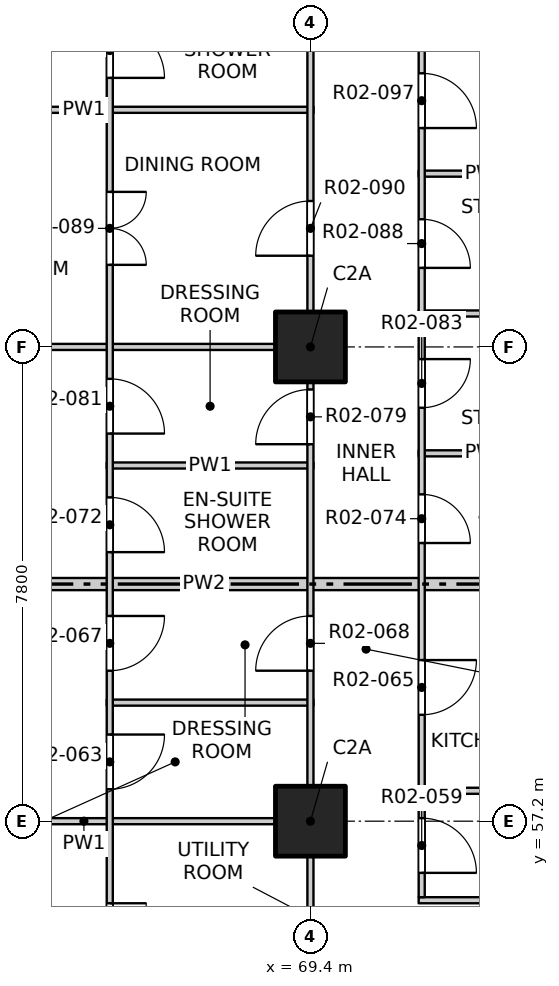
"""IFC4 building model, lengths in metres.
Left out: names, types, materials, properties, quantities, classifications, styles, units other than length and angle.
Written with IfcOpenShell. Run it as: python <this file> out.ifc"""

import sys

from ifc_helpers import new_model, si_unit, direction, frame, frame_2d, origin, origin_2d, place, context, subcontext, project, spatial, rectangle, extrude, element, fill, save


model = new_model("IFC4")
c1 = context("Model", 3, precision=1e-05, world=origin(), true_north=direction((0.0, 1.0)))
c2 = subcontext(c1, "Body", "Model", "MODEL_VIEW")
j1 = project(units=[si_unit("LENGTHUNIT", "METRE"), si_unit("PLANEANGLEUNIT", "RADIAN")], contexts=[c1])
p1 = place(None, origin())
s1 = spatial("IfcSite", under=j1, at=p1, CompositionType="ELEMENT")
p2 = place(p1, origin())
s2 = spatial("IfcBuilding", under=s1, at=p2, CompositionType="ELEMENT")
p3 = place(p2, frame((0.0, 0.0, 36.5)))
s3 = spatial("IfcBuildingStorey", under=s2, at=p3, CompositionType="ELEMENT", Elevation=36.5)
for number, where, z_axis, x_axis in (
    (1, (69.4, 57.2, -0.25), (0.0, 0.0, 1.0), (1.0, 0.0, 0.0)),
    (2, (69.4, 65.0, -0.25), (0.0, 0.0, 1.0), (1.0, 0.0, 0.0)),
):
    element("IfcColumn", number, at=place(p3, frame(where, z_axis=z_axis, x_axis=x_axis)), inside=s3, PredefinedType="COLUMN", context=c2, shape_type="SweptSolid", body=[
        extrude(rectangle(XDim=1.15, YDim=1.15, at=origin_2d()), origin(), (0.0, 0.0, 1.0), 3.4),
    ])
p4 = place(p3, frame((71.18, 55.9, 0.0), z_axis=(0.0, 0.0, 1.0), x_axis=(1.0, 0.0, 0.0)))
e3 = element("IfcWall", 3, at=p4, inside=s3, PredefinedType="PARTITIONING", context=c2, shape_type="SweptSolid", body=[
    extrude(rectangle(XDim=2.22, YDim=0.1, at=frame_2d((1.11, 0.0))), origin(), (0.0, 0.0, 1.0), 3.15),
])
p5 = place(p3, frame((61.9, 57.2, 0.0), z_axis=(0.0, 0.0, 1.0), x_axis=(1.0, 0.0, 0.0)))
e4 = element("IfcWall", 4, at=p5, inside=s3, PredefinedType="PARTITIONING", context=c2, shape_type="SweptSolid", body=[
    extrude(rectangle(XDim=7.55, YDim=0.1, at=frame_2d((3.775, 0.0))), origin(), (0.0, 0.0, 1.0), 2.55),
])
p6 = place(p3, frame((71.18, 57.7, 0.0), z_axis=(0.0, 0.0, 1.0), x_axis=(1.0, 0.0, 0.0)))
e5 = element("IfcWall", 5, at=p6, inside=s3, PredefinedType="PARTITIONING", context=c2, shape_type="SweptSolid", body=[
    extrude(rectangle(XDim=2.22, YDim=0.1, at=frame_2d((1.11, 0.0))), origin(), (0.0, 0.0, 1.0), 3.15),
])
p7 = place(p3, frame((66.05, 59.15, 0.0), z_axis=(0.0, 0.0, 1.0), x_axis=(1.0, 0.0, 0.0)))
e6 = element("IfcWall", 6, at=p7, inside=s3, PredefinedType="PARTITIONING", context=c2, shape_type="SweptSolid", body=[
    extrude(rectangle(XDim=3.4, YDim=0.1, at=frame_2d((1.7, 0.0))), origin(), (0.0, 0.0, 1.0), 3.15),
])
p8 = place(p3, frame((61.9, 61.1, 0.0), z_axis=(0.0, 0.0, 1.0), x_axis=(1.0, 0.0, 0.0)))
e7 = element("IfcWall", 7, at=p8, inside=s3, PredefinedType="PARTITIONING", context=c2, shape_type="SweptSolid", body=[
    extrude(rectangle(XDim=11.5, YDim=0.2, at=frame_2d((5.75, 0.0))), origin(), (0.0, 0.0, 1.0), 3.15),
])
p9 = place(p3, frame((66.05, 63.05, 0.0), z_axis=(0.0, 0.0, 1.0), x_axis=(1.0, 0.0, 0.0)))
e8 = element("IfcWall", 8, at=p9, inside=s3, PredefinedType="PARTITIONING", context=c2, shape_type="SweptSolid", body=[
    extrude(rectangle(XDim=3.4, YDim=0.1, at=frame_2d((1.7, 0.0))), origin(), (0.0, 0.0, 1.0), 3.15),
])
p10 = place(p3, frame((71.18, 63.25, 0.0), z_axis=(0.0, 0.0, 1.0), x_axis=(1.0, 0.0, 0.0)))
e9 = element("IfcWall", 9, at=p10, inside=s3, PredefinedType="PARTITIONING", context=c2, shape_type="SweptSolid", body=[
    extrude(rectangle(XDim=2.22, YDim=0.1, at=frame_2d((1.11, 0.0))), origin(), (0.0, 0.0, 1.0), 3.15),
])
p11 = place(p3, frame((61.9, 65.0, 0.0), z_axis=(0.0, 0.0, 1.0), x_axis=(1.0, 0.0, 0.0)))
e10 = element("IfcWall", 10, at=p11, inside=s3, PredefinedType="PARTITIONING", context=c2, shape_type="SweptSolid", body=[
    extrude(rectangle(XDim=7.55, YDim=0.1, at=frame_2d((3.775, 0.0))), origin(), (0.0, 0.0, 1.0), 2.55),
])
for number, where, z_axis, x_axis in (
    (11, (71.18, 65.55, 0.0), (0.0, 0.0, 1.0), (1.0, 0.0, 0.0)),
    (12, (71.18, 67.85, 0.0), (0.0, 0.0, 1.0), (1.0, 0.0, 0.0)),
):
    element("IfcWall", number, at=place(p3, frame(where, z_axis=z_axis, x_axis=x_axis)), inside=s3, PredefinedType="PARTITIONING", context=c2, shape_type="SweptSolid", body=[
        extrude(rectangle(XDim=2.22, YDim=0.1, at=frame_2d((1.11, 0.0))), origin(), (0.0, 0.0, 1.0), 3.15),
    ])
p12 = place(p3, frame((61.9, 68.9, 0.0), z_axis=(0.0, 0.0, 1.0), x_axis=(1.0, 0.0, 0.0)))
e13 = element("IfcWall", 13, at=p12, inside=s3, PredefinedType="PARTITIONING", context=c2, shape_type="SweptSolid", body=[
    extrude(rectangle(XDim=7.55, YDim=0.1, at=frame_2d((3.775, 0.0))), origin(), (0.0, 0.0, 1.0), 3.15),
])
p13 = place(p3, frame((66.1, 41.9, 0.0), z_axis=(0.0, 0.0, 1.0), x_axis=(0.0, 1.0, 0.0)))
e14 = element("IfcWall", 14, at=p13, inside=s3, PredefinedType="PARTITIONING", context=c2, shape_type="SweptSolid", body=[
    extrude(rectangle(XDim=34.7, YDim=0.1, at=frame_2d((17.35, 0.0))), origin(), (0.0, 0.0, 1.0), 3.15),
])
p14 = place(p13, frame((1.05, 0.0, 0.0)))
e15 = element("IfcOpeningElement", 15, at=p14, cuts=e14, PredefinedType="OPENING", context=c2, shape_type="SweptSolid", body=[
    extrude(rectangle(XDim=1.2, YDim=2.1, at=frame_2d((0.6, 1.05))), frame((0.0, 0.06, 0.0), z_axis=(0.0, -1.0, 0.0), x_axis=(1.0, 0.0, 0.0)), (0.0, 0.0, 1.0), 0.12),
])
p15 = place(p13, frame((4.95, 0.0, 0.0)))
e16 = element("IfcOpeningElement", 16, at=p15, cuts=e14, PredefinedType="OPENING", context=c2, shape_type="SweptSolid", body=[
    extrude(rectangle(XDim=1.2, YDim=2.1, at=frame_2d((0.6, 1.05))), frame((0.0, 0.06, 0.0), z_axis=(0.0, -1.0, 0.0), x_axis=(1.0, 0.0, 0.0)), (0.0, 0.0, 1.0), 0.12),
])
p16 = place(p13, frame((8.025, 0.0, 0.0)))
e17 = element("IfcOpeningElement", 17, at=p16, cuts=e14, PredefinedType="OPENING", context=c2, shape_type="SweptSolid", body=[
    extrude(rectangle(XDim=0.9, YDim=2.1, at=frame_2d((0.45, 1.05))), frame((0.0, 0.06, 0.0), z_axis=(0.0, -1.0, 0.0), x_axis=(1.0, 0.0, 0.0)), (0.0, 0.0, 1.0), 0.12),
])
p17 = place(p13, frame((9.975, 0.0, 0.0)))
e18 = element("IfcOpeningElement", 18, at=p17, cuts=e14, PredefinedType="OPENING", context=c2, shape_type="SweptSolid", body=[
    extrude(rectangle(XDim=0.9, YDim=2.1, at=frame_2d((0.45, 1.05))), frame((0.0, 0.06, 0.0), z_axis=(0.0, -1.0, 0.0), x_axis=(1.0, 0.0, 0.0)), (0.0, 0.0, 1.0), 0.12),
])
p18 = place(p13, frame((12.75, 0.0, 0.0)))
e19 = element("IfcOpeningElement", 19, at=p18, cuts=e14, PredefinedType="OPENING", context=c2, shape_type="SweptSolid", body=[
    extrude(rectangle(XDim=1.2, YDim=2.1, at=frame_2d((0.6, 1.05))), frame((0.0, 0.06, 0.0), z_axis=(0.0, -1.0, 0.0), x_axis=(1.0, 0.0, 0.0)), (0.0, 0.0, 1.0), 0.12),
])
p19 = place(p13, frame((15.825, 0.0, 0.0)))
e20 = element("IfcOpeningElement", 20, at=p19, cuts=e14, PredefinedType="OPENING", context=c2, shape_type="SweptSolid", body=[
    extrude(rectangle(XDim=0.9, YDim=2.1, at=frame_2d((0.45, 1.05))), frame((0.0, 0.06, 0.0), z_axis=(0.0, -1.0, 0.0), x_axis=(1.0, 0.0, 0.0)), (0.0, 0.0, 1.0), 0.12),
])
p20 = place(p13, frame((17.775, 0.0, 0.0)))
e21 = element("IfcOpeningElement", 21, at=p20, cuts=e14, PredefinedType="OPENING", context=c2, shape_type="SweptSolid", body=[
    extrude(rectangle(XDim=0.9, YDim=2.1, at=frame_2d((0.45, 1.05))), frame((0.0, 0.06, 0.0), z_axis=(0.0, -1.0, 0.0), x_axis=(1.0, 0.0, 0.0)), (0.0, 0.0, 1.0), 0.12),
])
p21 = place(p13, frame((19.725, 0.0, 0.0)))
e22 = element("IfcOpeningElement", 22, at=p21, cuts=e14, PredefinedType="OPENING", context=c2, shape_type="SweptSolid", body=[
    extrude(rectangle(XDim=0.9, YDim=2.1, at=frame_2d((0.45, 1.05))), frame((0.0, 0.06, 0.0), z_axis=(0.0, -1.0, 0.0), x_axis=(1.0, 0.0, 0.0)), (0.0, 0.0, 1.0), 0.12),
])
p22 = place(p13, frame((21.675, 0.0, 0.0)))
e23 = element("IfcOpeningElement", 23, at=p22, cuts=e14, PredefinedType="OPENING", context=c2, shape_type="SweptSolid", body=[
    extrude(rectangle(XDim=0.9, YDim=2.1, at=frame_2d((0.45, 1.05))), frame((0.0, 0.06, 0.0), z_axis=(0.0, -1.0, 0.0), x_axis=(1.0, 0.0, 0.0)), (0.0, 0.0, 1.0), 0.12),
])
p23 = place(p13, frame((24.45, 0.0, 0.0)))
e24 = element("IfcOpeningElement", 24, at=p23, cuts=e14, PredefinedType="OPENING", context=c2, shape_type="SweptSolid", body=[
    extrude(rectangle(XDim=1.2, YDim=2.1, at=frame_2d((0.6, 1.05))), frame((0.0, 0.06, 0.0), z_axis=(0.0, -1.0, 0.0), x_axis=(1.0, 0.0, 0.0)), (0.0, 0.0, 1.0), 0.12),
])
p24 = place(p13, frame((27.525, 0.0, 0.0)))
e25 = element("IfcOpeningElement", 25, at=p24, cuts=e14, PredefinedType="OPENING", context=c2, shape_type="SweptSolid", body=[
    extrude(rectangle(XDim=0.9, YDim=2.1, at=frame_2d((0.45, 1.05))), frame((0.0, 0.06, 0.0), z_axis=(0.0, -1.0, 0.0), x_axis=(1.0, 0.0, 0.0)), (0.0, 0.0, 1.0), 0.12),
])
p25 = place(p13, frame((29.475, 0.0, 0.0)))
e26 = element("IfcOpeningElement", 26, at=p25, cuts=e14, PredefinedType="OPENING", context=c2, shape_type="SweptSolid", body=[
    extrude(rectangle(XDim=0.9, YDim=2.1, at=frame_2d((0.45, 1.05))), frame((0.0, 0.06, 0.0), z_axis=(0.0, -1.0, 0.0), x_axis=(1.0, 0.0, 0.0)), (0.0, 0.0, 1.0), 0.12),
])
p26 = place(p13, frame((31.425, 0.0, 0.0)))
e27 = element("IfcOpeningElement", 27, at=p26, cuts=e14, PredefinedType="OPENING", context=c2, shape_type="SweptSolid", body=[
    extrude(rectangle(XDim=0.9, YDim=2.1, at=frame_2d((0.45, 1.05))), frame((0.0, 0.06, 0.0), z_axis=(0.0, -1.0, 0.0), x_axis=(1.0, 0.0, 0.0)), (0.0, 0.0, 1.0), 0.12),
])
p27 = place(p13, frame((33.375, 0.0, 0.0)))
e28 = element("IfcOpeningElement", 28, at=p27, cuts=e14, PredefinedType="OPENING", context=c2, shape_type="SweptSolid", body=[
    extrude(rectangle(XDim=0.9, YDim=2.1, at=frame_2d((0.45, 1.05))), frame((0.0, 0.06, 0.0), z_axis=(0.0, -1.0, 0.0), x_axis=(1.0, 0.0, 0.0)), (0.0, 0.0, 1.0), 0.12),
])
p28 = place(p3, frame((69.4, 41.9, 0.0), z_axis=(0.0, 0.0, 1.0), x_axis=(0.0, 1.0, 0.0)))
e29 = element("IfcWall", 29, at=p28, inside=s3, PredefinedType="PARTITIONING", context=c2, shape_type="SweptSolid", body=[
    extrude(rectangle(XDim=46.2, YDim=0.1, at=frame_2d((23.1, 0.0))), origin(), (0.0, 0.0, 1.0), 3.15),
])
p29 = place(p28, frame((1.2, 0.0, 0.0)))
e30 = element("IfcOpeningElement", 30, at=p29, cuts=e29, PredefinedType="OPENING", context=c2, shape_type="SweptSolid", body=[
    extrude(rectangle(XDim=0.9, YDim=2.1, at=frame_2d((0.45, 1.05))), frame((0.0, 0.06, 0.0), z_axis=(0.0, -1.0, 0.0), x_axis=(1.0, 0.0, 0.0)), (0.0, 0.0, 1.0), 0.12),
])
p30 = place(p28, frame((5.1, 0.0, 0.0)))
e31 = element("IfcOpeningElement", 31, at=p30, cuts=e29, PredefinedType="OPENING", context=c2, shape_type="SweptSolid", body=[
    extrude(rectangle(XDim=0.9, YDim=2.1, at=frame_2d((0.45, 1.05))), frame((0.0, 0.06, 0.0), z_axis=(0.0, -1.0, 0.0), x_axis=(1.0, 0.0, 0.0)), (0.0, 0.0, 1.0), 0.12),
])
p31 = place(p28, frame((9.975, 0.0, 0.0)))
e32 = element("IfcOpeningElement", 32, at=p31, cuts=e29, PredefinedType="OPENING", context=c2, shape_type="SweptSolid", body=[
    extrude(rectangle(XDim=0.9, YDim=2.1, at=frame_2d((0.45, 1.05))), frame((0.0, 0.06, 0.0), z_axis=(0.0, -1.0, 0.0), x_axis=(1.0, 0.0, 0.0)), (0.0, 0.0, 1.0), 0.12),
])
p32 = place(p28, frame((12.9, 0.0, 0.0)))
e33 = element("IfcOpeningElement", 33, at=p32, cuts=e29, PredefinedType="OPENING", context=c2, shape_type="SweptSolid", body=[
    extrude(rectangle(XDim=0.9, YDim=2.1, at=frame_2d((0.45, 1.05))), frame((0.0, 0.06, 0.0), z_axis=(0.0, -1.0, 0.0), x_axis=(1.0, 0.0, 0.0)), (0.0, 0.0, 1.0), 0.12),
])
p33 = place(p28, frame((17.775, 0.0, 0.0)))
e34 = element("IfcOpeningElement", 34, at=p33, cuts=e29, PredefinedType="OPENING", context=c2, shape_type="SweptSolid", body=[
    extrude(rectangle(XDim=0.9, YDim=2.1, at=frame_2d((0.45, 1.05))), frame((0.0, 0.06, 0.0), z_axis=(0.0, -1.0, 0.0), x_axis=(1.0, 0.0, 0.0)), (0.0, 0.0, 1.0), 0.12),
])
p34 = place(p28, frame((21.5, 0.0, 0.0)))
e35 = element("IfcOpeningElement", 35, at=p34, cuts=e29, PredefinedType="OPENING", context=c2, shape_type="SweptSolid", body=[
    extrude(rectangle(XDim=0.9, YDim=2.1, at=frame_2d((0.45, 1.05))), frame((0.0, 0.06, 0.0), z_axis=(0.0, -1.0, 0.0), x_axis=(1.0, 0.0, 0.0)), (0.0, 0.0, 1.0), 0.12),
])
p35 = place(p28, frame((24.6, 0.0, 0.0)))
e36 = element("IfcOpeningElement", 36, at=p35, cuts=e29, PredefinedType="OPENING", context=c2, shape_type="SweptSolid", body=[
    extrude(rectangle(XDim=0.9, YDim=2.1, at=frame_2d((0.45, 1.05))), frame((0.0, 0.06, 0.0), z_axis=(0.0, -1.0, 0.0), x_axis=(1.0, 0.0, 0.0)), (0.0, 0.0, 1.0), 0.12),
])
p36 = place(p28, frame((29.3, 0.0, 0.0)))
e37 = element("IfcOpeningElement", 37, at=p36, cuts=e29, PredefinedType="OPENING", context=c2, shape_type="SweptSolid", body=[
    extrude(rectangle(XDim=0.9, YDim=2.1, at=frame_2d((0.45, 1.05))), frame((0.0, 0.06, 0.0), z_axis=(0.0, -1.0, 0.0), x_axis=(1.0, 0.0, 0.0)), (0.0, 0.0, 1.0), 0.12),
])
p37 = place(p28, frame((33.375, 0.0, 0.0)))
e38 = element("IfcOpeningElement", 38, at=p37, cuts=e29, PredefinedType="OPENING", context=c2, shape_type="SweptSolid", body=[
    extrude(rectangle(XDim=0.9, YDim=2.1, at=frame_2d((0.45, 1.05))), frame((0.0, 0.06, 0.0), z_axis=(0.0, -1.0, 0.0), x_axis=(1.0, 0.0, 0.0)), (0.0, 0.0, 1.0), 0.12),
])
p38 = place(p28, frame((37.1, 0.0, 0.0)))
e39 = element("IfcOpeningElement", 39, at=p38, cuts=e29, PredefinedType="OPENING", context=c2, shape_type="SweptSolid", body=[
    extrude(rectangle(XDim=0.9, YDim=2.1, at=frame_2d((0.45, 1.05))), frame((0.0, 0.06, 0.0), z_axis=(0.0, -1.0, 0.0), x_axis=(1.0, 0.0, 0.0)), (0.0, 0.0, 1.0), 0.12),
])
p39 = place(p28, frame((41.175, 0.0, 0.0)))
e40 = element("IfcOpeningElement", 40, at=p39, cuts=e29, PredefinedType="OPENING", context=c2, shape_type="SweptSolid", body=[
    extrude(rectangle(XDim=0.9, YDim=2.1, at=frame_2d((0.45, 1.05))), frame((0.0, 0.06, 0.0), z_axis=(0.0, -1.0, 0.0), x_axis=(1.0, 0.0, 0.0)), (0.0, 0.0, 1.0), 0.12),
])
p40 = place(p28, frame((44.1, 0.0, 0.0)))
e41 = element("IfcOpeningElement", 41, at=p40, cuts=e29, PredefinedType="OPENING", context=c2, shape_type="SweptSolid", body=[
    extrude(rectangle(XDim=0.9, YDim=2.1, at=frame_2d((0.45, 1.05))), frame((0.0, 0.06, 0.0), z_axis=(0.0, -1.0, 0.0), x_axis=(1.0, 0.0, 0.0)), (0.0, 0.0, 1.0), 0.12),
])
p41 = place(p3, frame((71.23, 55.95, 0.0), z_axis=(0.0, 0.0, 1.0), x_axis=(0.0, 1.0, 0.0)))
e42 = element("IfcWall", 42, at=p41, inside=s3, PredefinedType="PARTITIONING", context=c2, shape_type="SweptSolid", body=[
    extrude(rectangle(XDim=14.25, YDim=0.1, at=frame_2d((7.125, 0.0))), origin(), (0.0, 0.0, 1.0), 3.15),
])
p42 = place(p41, frame((0.4, 0.0, 0.0)))
e43 = element("IfcOpeningElement", 43, at=p42, cuts=e42, PredefinedType="OPENING", context=c2, shape_type="SweptSolid", body=[
    extrude(rectangle(XDim=0.9, YDim=2.1, at=frame_2d((0.45, 1.05))), frame((0.0, 0.06, 0.0), z_axis=(0.0, -1.0, 0.0), x_axis=(1.0, 0.0, 0.0)), (0.0, 0.0, 1.0), 0.12),
])
p43 = place(p41, frame((3.0, 0.0, 0.0)))
e44 = element("IfcOpeningElement", 44, at=p43, cuts=e42, PredefinedType="OPENING", context=c2, shape_type="SweptSolid", body=[
    extrude(rectangle(XDim=0.9, YDim=2.1, at=frame_2d((0.45, 1.05))), frame((0.0, 0.06, 0.0), z_axis=(0.0, -1.0, 0.0), x_axis=(1.0, 0.0, 0.0)), (0.0, 0.0, 1.0), 0.12),
])
p44 = place(p41, frame((5.825, 0.0, 0.0)))
e45 = element("IfcOpeningElement", 45, at=p44, cuts=e42, PredefinedType="OPENING", context=c2, shape_type="SweptSolid", body=[
    extrude(rectangle(XDim=0.8, YDim=2.1, at=frame_2d((0.4, 1.05))), frame((0.0, 0.06, 0.0), z_axis=(0.0, -1.0, 0.0), x_axis=(1.0, 0.0, 0.0)), (0.0, 0.0, 1.0), 0.12),
])
p45 = place(p41, frame((8.05, 0.0, 0.0)))
e46 = element("IfcOpeningElement", 46, at=p45, cuts=e42, PredefinedType="OPENING", context=c2, shape_type="SweptSolid", body=[
    extrude(rectangle(XDim=0.8, YDim=2.1, at=frame_2d((0.4, 1.05))), frame((0.0, 0.06, 0.0), z_axis=(0.0, -1.0, 0.0), x_axis=(1.0, 0.0, 0.0)), (0.0, 0.0, 1.0), 0.12),
])
p46 = place(p41, frame((10.35, 0.0, 0.0)))
e47 = element("IfcOpeningElement", 47, at=p46, cuts=e42, PredefinedType="OPENING", context=c2, shape_type="SweptSolid", body=[
    extrude(rectangle(XDim=0.8, YDim=2.1, at=frame_2d((0.4, 1.05))), frame((0.0, 0.06, 0.0), z_axis=(0.0, -1.0, 0.0), x_axis=(1.0, 0.0, 0.0)), (0.0, 0.0, 1.0), 0.12),
])
p47 = place(p41, frame((12.65, 0.0, 0.0)))
e48 = element("IfcOpeningElement", 48, at=p47, cuts=e42, PredefinedType="OPENING", context=c2, shape_type="SweptSolid", body=[
    extrude(rectangle(XDim=0.9, YDim=2.1, at=frame_2d((0.45, 1.05))), frame((0.0, 0.06, 0.0), z_axis=(0.0, -1.0, 0.0), x_axis=(1.0, 0.0, 0.0)), (0.0, 0.0, 1.0), 0.12),
])
p48 = place(p18, origin())
e49 = element("IfcDoor", 49, at=p48, inside=s3, OperationType="DOUBLE_DOOR_SINGLE_SWING", PredefinedType="DOOR", context=c2, shape_type="SweptSolid", body=[
    extrude(rectangle(XDim=1.2, YDim=2.1, at=frame_2d((0.6, 1.05))), frame((0.0, 0.025, 0.0), z_axis=(0.0, -1.0, 0.0), x_axis=(1.0, 0.0, 0.0)), (0.0, 0.0, 1.0), 0.05),
])
fill(e19, e49)
p49 = place(p42, origin())
e50 = element("IfcDoor", 50, at=p49, inside=s3, OperationType="SINGLE_SWING_RIGHT", PredefinedType="DOOR", context=c2, shape_type="SweptSolid", body=[
    extrude(rectangle(XDim=0.9, YDim=2.1, at=frame_2d((0.45, 1.05))), frame((0.0, 0.025, 0.0), z_axis=(0.0, -1.0, 0.0), x_axis=(1.0, 0.0, 0.0)), (0.0, 0.0, 1.0), 0.05),
])
fill(e43, e50)
p50 = place(p19, origin())
e51 = element("IfcDoor", 51, at=p50, inside=s3, OperationType="SINGLE_SWING_LEFT", PredefinedType="DOOR", context=c2, shape_type="SweptSolid", body=[
    extrude(rectangle(XDim=0.9, YDim=2.1, at=frame_2d((0.45, 1.05))), frame((0.0, 0.025, 0.0), z_axis=(0.0, -1.0, 0.0), x_axis=(1.0, 0.0, 0.0)), (0.0, 0.0, 1.0), 0.05),
])
fill(e20, e51)
p51 = place(p43, origin())
e52 = element("IfcDoor", 52, at=p51, inside=s3, OperationType="SINGLE_SWING_LEFT", PredefinedType="DOOR", context=c2, shape_type="SweptSolid", body=[
    extrude(rectangle(XDim=0.9, YDim=2.1, at=frame_2d((0.45, 1.05))), frame((0.0, 0.025, 0.0), z_axis=(0.0, -1.0, 0.0), x_axis=(1.0, 0.0, 0.0)), (0.0, 0.0, 1.0), 0.05),
])
fill(e44, e52)
p52 = place(p20, origin())
e53 = element("IfcDoor", 53, at=p52, inside=s3, OperationType="SINGLE_SWING_LEFT", PredefinedType="DOOR", context=c2, shape_type="SweptSolid", body=[
    extrude(rectangle(XDim=0.9, YDim=2.1, at=frame_2d((0.45, 1.05))), frame((0.0, 0.025, 0.0), z_axis=(0.0, -1.0, 0.0), x_axis=(1.0, 0.0, 0.0)), (0.0, 0.0, 1.0), 0.05),
])
fill(e21, e53)
p53 = place(p33, origin())
e54 = element("IfcDoor", 54, at=p53, inside=s3, OperationType="SINGLE_SWING_LEFT", PredefinedType="DOOR", context=c2, shape_type="SweptSolid", body=[
    extrude(rectangle(XDim=0.9, YDim=2.1, at=frame_2d((0.45, 1.05))), frame((0.0, 0.025, 0.0), z_axis=(0.0, -1.0, 0.0), x_axis=(1.0, 0.0, 0.0)), (0.0, 0.0, 1.0), 0.05),
])
fill(e34, e54)
p54 = place(p21, origin())
e55 = element("IfcDoor", 55, at=p54, inside=s3, OperationType="SINGLE_SWING_RIGHT", PredefinedType="DOOR", context=c2, shape_type="SweptSolid", body=[
    extrude(rectangle(XDim=0.9, YDim=2.1, at=frame_2d((0.45, 1.05))), frame((0.0, 0.025, 0.0), z_axis=(0.0, -1.0, 0.0), x_axis=(1.0, 0.0, 0.0)), (0.0, 0.0, 1.0), 0.05),
])
fill(e22, e55)
p55 = place(p44, origin())
e56 = element("IfcDoor", 56, at=p55, inside=s3, OperationType="SINGLE_SWING_RIGHT", PredefinedType="DOOR", context=c2, shape_type="SweptSolid", body=[
    extrude(rectangle(XDim=0.8, YDim=2.1, at=frame_2d((0.4, 1.05))), frame((0.0, 0.025, 0.0), z_axis=(0.0, -1.0, 0.0), x_axis=(1.0, 0.0, 0.0)), (0.0, 0.0, 1.0), 0.05),
])
fill(e45, e56)
p56 = place(p34, origin())
e57 = element("IfcDoor", 57, at=p56, inside=s3, OperationType="SINGLE_SWING_LEFT", PredefinedType="DOOR", context=c2, shape_type="SweptSolid", body=[
    extrude(rectangle(XDim=0.9, YDim=2.1, at=frame_2d((0.45, 1.05))), frame((0.0, 0.025, 0.0), z_axis=(0.0, -1.0, 0.0), x_axis=(1.0, 0.0, 0.0)), (0.0, 0.0, 1.0), 0.05),
])
fill(e35, e57)
p57 = place(p22, origin())
e58 = element("IfcDoor", 58, at=p57, inside=s3, OperationType="SINGLE_SWING_RIGHT", PredefinedType="DOOR", context=c2, shape_type="SweptSolid", body=[
    extrude(rectangle(XDim=0.9, YDim=2.1, at=frame_2d((0.45, 1.05))), frame((0.0, 0.025, 0.0), z_axis=(0.0, -1.0, 0.0), x_axis=(1.0, 0.0, 0.0)), (0.0, 0.0, 1.0), 0.05),
])
fill(e23, e58)
p58 = place(p45, origin())
e59 = element("IfcDoor", 59, at=p58, inside=s3, OperationType="SINGLE_SWING_LEFT", PredefinedType="DOOR", context=c2, shape_type="SweptSolid", body=[
    extrude(rectangle(XDim=0.8, YDim=2.1, at=frame_2d((0.4, 1.05))), frame((0.0, 0.025, 0.0), z_axis=(0.0, -1.0, 0.0), x_axis=(1.0, 0.0, 0.0)), (0.0, 0.0, 1.0), 0.05),
])
fill(e46, e59)
p59 = place(p46, origin())
e60 = element("IfcDoor", 60, at=p59, inside=s3, OperationType="SINGLE_SWING_RIGHT", PredefinedType="DOOR", context=c2, shape_type="SweptSolid", body=[
    extrude(rectangle(XDim=0.8, YDim=2.1, at=frame_2d((0.4, 1.05))), frame((0.0, 0.025, 0.0), z_axis=(0.0, -1.0, 0.0), x_axis=(1.0, 0.0, 0.0)), (0.0, 0.0, 1.0), 0.05),
])
fill(e47, e60)
p60 = place(p23, origin())
e61 = element("IfcDoor", 61, at=p60, inside=s3, OperationType="DOUBLE_DOOR_SINGLE_SWING", PredefinedType="DOOR", context=c2, shape_type="SweptSolid", body=[
    extrude(rectangle(XDim=1.2, YDim=2.1, at=frame_2d((0.6, 1.05))), frame((0.0, 0.025, 0.0), z_axis=(0.0, -1.0, 0.0), x_axis=(1.0, 0.0, 0.0)), (0.0, 0.0, 1.0), 0.05),
])
fill(e24, e61)
p61 = place(p35, origin())
e62 = element("IfcDoor", 62, at=p61, inside=s3, OperationType="SINGLE_SWING_LEFT", PredefinedType="DOOR", context=c2, shape_type="SweptSolid", body=[
    extrude(rectangle(XDim=0.9, YDim=2.1, at=frame_2d((0.45, 1.05))), frame((0.0, 0.025, 0.0), z_axis=(0.0, -1.0, 0.0), x_axis=(1.0, 0.0, 0.0)), (0.0, 0.0, 1.0), 0.05),
])
fill(e36, e62)
p62 = place(p47, origin())
e63 = element("IfcDoor", 63, at=p62, inside=s3, OperationType="SINGLE_SWING_RIGHT", PredefinedType="DOOR", context=c2, shape_type="SweptSolid", body=[
    extrude(rectangle(XDim=0.9, YDim=2.1, at=frame_2d((0.45, 1.05))), frame((0.0, 0.025, 0.0), z_axis=(0.0, -1.0, 0.0), x_axis=(1.0, 0.0, 0.0)), (0.0, 0.0, 1.0), 0.05),
])
fill(e48, e63)
p63 = place(p24, origin())
e64 = element("IfcDoor", 64, at=p63, inside=s3, OperationType="SINGLE_SWING_RIGHT", PredefinedType="DOOR", context=c2, shape_type="SweptSolid", body=[
    extrude(rectangle(XDim=0.9, YDim=2.1, at=frame_2d((0.45, 1.05))), frame((0.0, 0.025, 0.0), z_axis=(0.0, -1.0, 0.0), x_axis=(1.0, 0.0, 0.0)), (0.0, 0.0, 1.0), 0.05),
])
fill(e25, e64)
save(model, sys.argv[1])
